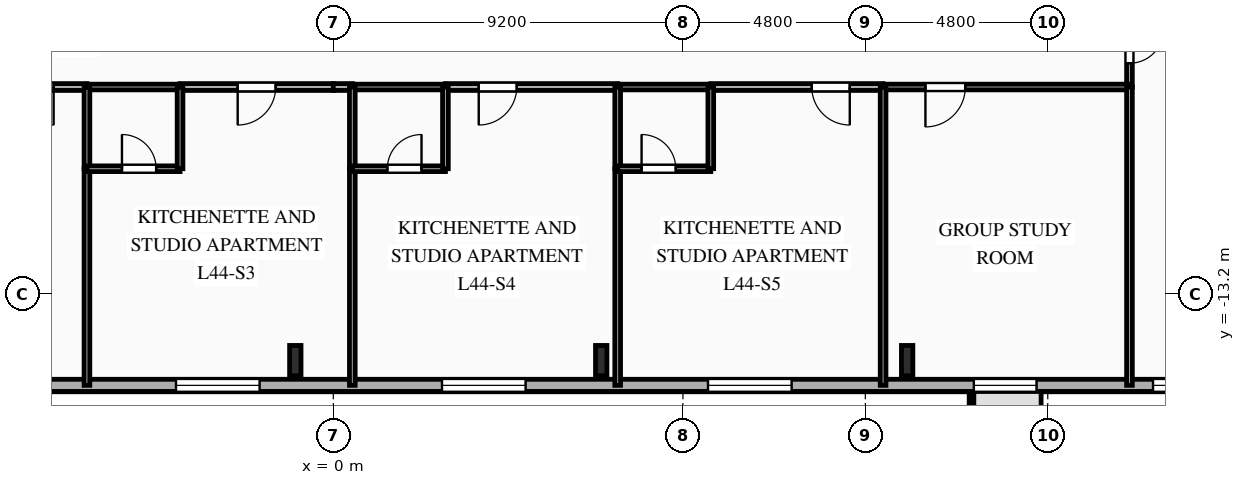
"""IFC4 building model, lengths in metres.
Left out: names, types, materials, properties, quantities, classifications, styles, units other than length and angle.
Written with IfcOpenShell. Run it as: python <this file> out.ifc"""

import sys

from ifc_helpers import new_model, si_unit, direction, frame, frame_2d, origin, origin_2d, place, context, subcontext, project, spatial, rectangle, i_section, extrude, element, fill, save


model = new_model("IFC4")
c1 = context("Model", 3, precision=1e-05, world=origin(), true_north=direction((0.0, 1.0)))
c2 = subcontext(c1, "Body", "Model", "MODEL_VIEW")
j1 = project(units=[si_unit("LENGTHUNIT", "METRE"), si_unit("PLANEANGLEUNIT", "RADIAN")], contexts=[c1])
p1 = place(None, origin())
s1 = spatial("IfcSite", under=j1, at=p1, CompositionType="ELEMENT")
p2 = place(p1, origin())
s2 = spatial("IfcBuilding", under=s1, at=p2, CompositionType="ELEMENT")
p3 = place(p2, frame((0.0, 0.0, 157.8)))
s3 = spatial("IfcBuildingStorey", under=s2, at=p3, CompositionType="ELEMENT", Elevation=157.8)
for number, where, z_axis, x_axis in (
    (1, (-1.0, -14.95, 0.0), (0.0, 0.0, 1.0), (1.0, 0.0, 0.0)),
    (2, (7.05, -14.95, 0.0), (0.0, 0.0, 1.0), (1.0, 0.0, 0.0)),
    (3, (15.1, -14.95, 0.0), (0.0, 0.0, 1.0), (1.0, 0.0, 0.0)),
):
    element("IfcColumn", number, at=place(p3, frame(where, z_axis=z_axis, x_axis=x_axis)), inside=s3, PredefinedType="COLUMN", context=c2, shape_type="SweptSolid", body=[
        extrude(i_section(OverallWidth=0.3, OverallDepth=0.8, WebThickness=0.018, FlangeThickness=0.033, FilletRadius=0.03, at=origin_2d()), origin(), (0.0, 0.0, 1.0), 3.35),
    ])
p4 = place(p3, frame((23.8, -15.6, 0.0), z_axis=(0.0, 0.0, 1.0), x_axis=(-1.0, 0.0, 0.0)))
e4 = element("IfcWall", 4, at=p4, inside=s3, PredefinedType="SOLIDWALL", context=c2, shape_type="SweptSolid", body=[
    extrude(rectangle(XDim=49.6, YDim=0.32, at=frame_2d((24.8, 0.0))), origin(), (0.0, 0.0, 1.0), 3.04),
])
p5 = place(p4, frame((1.13, 0.0, 0.85)))
e5 = element("IfcOpeningElement", 5, at=p5, cuts=e4, PredefinedType="OPENING", context=c2, shape_type="SweptSolid", body=[
    extrude(rectangle(XDim=1.1, YDim=1.85, at=frame_2d((0.55, 0.925))), frame((0.0, 0.17, 0.0), z_axis=(0.0, -1.0, 0.0), x_axis=(1.0, 0.0, 0.0)), (0.0, 0.0, 1.0), 0.34),
])
p6 = place(p4, frame((5.295, 0.0, 0.85)))
e6 = element("IfcOpeningElement", 6, at=p6, cuts=e4, PredefinedType="OPENING", context=c2, shape_type="SweptSolid", body=[
    extrude(rectangle(XDim=1.65, YDim=1.85, at=frame_2d((0.825, 0.925))), frame((0.0, 0.17, 0.0), z_axis=(0.0, -1.0, 0.0), x_axis=(1.0, 0.0, 0.0)), (0.0, 0.0, 1.0), 0.34),
])
p7 = place(p4, frame((11.74, 0.0, 0.85)))
e7 = element("IfcOpeningElement", 7, at=p7, cuts=e4, PredefinedType="OPENING", context=c2, shape_type="SweptSolid", body=[
    extrude(rectangle(XDim=2.2, YDim=1.85, at=frame_2d((1.1, 0.925))), frame((0.0, 0.17, 0.0), z_axis=(0.0, -1.0, 0.0), x_axis=(1.0, 0.0, 0.0)), (0.0, 0.0, 1.0), 0.34),
])
p8 = place(p4, frame((18.74, 0.0, 0.85)))
e8 = element("IfcOpeningElement", 8, at=p8, cuts=e4, PredefinedType="OPENING", context=c2, shape_type="SweptSolid", body=[
    extrude(rectangle(XDim=2.2, YDim=1.85, at=frame_2d((1.1, 0.925))), frame((0.0, 0.17, 0.0), z_axis=(0.0, -1.0, 0.0), x_axis=(1.0, 0.0, 0.0)), (0.0, 0.0, 1.0), 0.34),
])
p9 = place(p4, frame((25.74, 0.0, 0.85)))
e9 = element("IfcOpeningElement", 9, at=p9, cuts=e4, PredefinedType="OPENING", context=c2, shape_type="SweptSolid", body=[
    extrude(rectangle(XDim=2.2, YDim=1.85, at=frame_2d((1.1, 0.925))), frame((0.0, 0.17, 0.0), z_axis=(0.0, -1.0, 0.0), x_axis=(1.0, 0.0, 0.0)), (0.0, 0.0, 1.0), 0.34),
])
p10 = place(p4, frame((33.348, 0.0, 0.85)))
e10 = element("IfcOpeningElement", 10, at=p10, cuts=e4, PredefinedType="OPENING", context=c2, shape_type="SweptSolid", body=[
    extrude(rectangle(XDim=2.2, YDim=1.85, at=frame_2d((1.1, 0.925))), frame((0.0, 0.17, 0.0), z_axis=(0.0, -1.0, 0.0), x_axis=(1.0, 0.0, 0.0)), (0.0, 0.0, 1.0), 0.34),
])
p11 = place(p4, frame((38.972, 0.0, 0.85)))
e11 = element("IfcOpeningElement", 11, at=p11, cuts=e4, PredefinedType="OPENING", context=c2, shape_type="SweptSolid", body=[
    extrude(rectangle(XDim=1.65, YDim=1.85, at=frame_2d((0.825, 0.925))), frame((0.0, 0.17, 0.0), z_axis=(0.0, -1.0, 0.0), x_axis=(1.0, 0.0, 0.0)), (0.0, 0.0, 1.0), 0.34),
])
p12 = place(p4, frame((45.895, 0.0, 0.85)))
e12 = element("IfcOpeningElement", 12, at=p12, cuts=e4, PredefinedType="OPENING", context=c2, shape_type="SweptSolid", body=[
    extrude(rectangle(XDim=1.65, YDim=1.85, at=frame_2d((0.825, 0.925))), frame((0.0, 0.17, 0.0), z_axis=(0.0, -1.0, 0.0), x_axis=(1.0, 0.0, 0.0)), (0.0, 0.0, 1.0), 0.34),
])
p13 = place(p3, frame((-6.483, -7.75, 0.0), z_axis=(0.0, 0.0, 1.0), x_axis=(-1.0, 0.0, 0.0)))
e13 = element("IfcWall", 13, at=p13, inside=s3, PredefinedType="PARTITIONING", context=c2, shape_type="SweptSolid", body=[
    extrude(rectangle(XDim=4.534, YDim=0.18, at=frame_2d((2.267, 0.0))), origin(), (0.0, 0.0, 1.0), 3.04),
])
p14 = place(p13, frame((0.877, 0.0, 0.0)))
e14 = element("IfcOpeningElement", 14, at=p14, cuts=e13, PredefinedType="OPENING", context=c2, shape_type="SweptSolid", body=[
    extrude(rectangle(XDim=1.0, YDim=2.15, at=frame_2d((0.5, 1.075))), frame((0.0, 0.1, 0.0), z_axis=(0.0, -1.0, 0.0), x_axis=(1.0, 0.0, 0.0)), (0.0, 0.0, 1.0), 0.2),
])
p15 = place(p3, frame((0.0, -7.75, 0.0), z_axis=(0.0, 0.0, 1.0), x_axis=(-1.0, 0.0, 0.0)))
e15 = element("IfcWall", 15, at=p15, inside=s3, PredefinedType="PARTITIONING", context=c2, shape_type="SweptSolid", body=[
    extrude(rectangle(XDim=4.033, YDim=0.18, at=frame_2d((2.017, 0.0))), origin(), (0.0, 0.0, 1.0), 3.04),
])
p16 = place(p15, frame((1.517, 0.0, 0.0)))
e16 = element("IfcOpeningElement", 16, at=p16, cuts=e15, PredefinedType="OPENING", context=c2, shape_type="SweptSolid", body=[
    extrude(rectangle(XDim=1.0, YDim=2.15, at=frame_2d((0.5, 1.075))), frame((0.0, 0.1, 0.0), z_axis=(0.0, -1.0, 0.0), x_axis=(1.0, 0.0, 0.0)), (0.0, 0.0, 1.0), 0.2),
])
p17 = place(p3, frame((-4.033, -7.75, 0.0), z_axis=(0.0, 0.0, 1.0), x_axis=(-1.0, 0.0, 0.0)))
e17 = element("IfcWall", 17, at=p17, inside=s3, PredefinedType="PLUMBINGWALL", context=c2, shape_type="SweptSolid", body=[
    extrude(rectangle(XDim=2.45, YDim=0.15, at=frame_2d((1.225, 0.0))), origin(), (0.0, 0.0, 1.0), 3.04),
])
p18 = place(p3, frame((20.95, -5.6, 0.0), z_axis=(0.0, 0.0, 1.0), x_axis=(0.0, -1.0, 0.0)))
e18 = element("IfcWall", 18, at=p18, inside=s3, PredefinedType="PARTITIONING", context=c2, shape_type="SweptSolid", body=[
    extrude(rectangle(XDim=2.15, YDim=0.15, at=frame_2d((1.075, 0.0))), origin(), (0.0, 0.0, 1.0), 3.04),
])
p19 = place(p18, frame((0.625, 0.0, 0.0)))
e19 = element("IfcOpeningElement", 19, at=p19, cuts=e18, PredefinedType="OPENING", context=c2, shape_type="SweptSolid", body=[
    extrude(rectangle(XDim=0.9, YDim=2.1, at=frame_2d((0.45, 1.05))), frame((0.0, 0.085, 0.0), z_axis=(0.0, -1.0, 0.0), x_axis=(1.0, 0.0, 0.0)), (0.0, 0.0, 1.0), 0.17),
])
p20 = place(p3, frame((0.5, -7.75, 0.0), z_axis=(0.0, 0.0, 1.0), x_axis=(-1.0, 0.0, 0.0)))
e20 = element("IfcWall", 20, at=p20, inside=s3, PredefinedType="PARTITIONING", context=c2, shape_type="SweptSolid", body=[
    extrude(rectangle(XDim=0.5, YDim=0.18, at=frame_2d((0.25, 0.0))), origin(), (0.0, 0.0, 1.0), 3.04),
])
p21 = place(p3, frame((7.483, -7.75, 0.0), z_axis=(0.0, 0.0, 1.0), x_axis=(-1.0, 0.0, 0.0)))
e21 = element("IfcWall", 21, at=p21, inside=s3, PredefinedType="PARTITIONING", context=c2, shape_type="SweptSolid", body=[
    extrude(rectangle(XDim=4.533, YDim=0.18, at=frame_2d((2.267, 0.0))), origin(), (0.0, 0.0, 1.0), 3.04),
])
p22 = place(p21, frame((2.656, 0.0, 0.0)))
e22 = element("IfcOpeningElement", 22, at=p22, cuts=e21, PredefinedType="OPENING", context=c2, shape_type="SweptSolid", body=[
    extrude(rectangle(XDim=1.0, YDim=2.15, at=frame_2d((0.5, 1.075))), frame((0.0, 0.1, 0.0), z_axis=(0.0, -1.0, 0.0), x_axis=(1.0, 0.0, 0.0)), (0.0, 0.0, 1.0), 0.2),
])
p23 = place(p3, frame((2.95, -7.75, 0.0), z_axis=(0.0, 0.0, 1.0), x_axis=(-1.0, 0.0, 0.0)))
e23 = element("IfcWall", 23, at=p23, inside=s3, PredefinedType="PLUMBINGWALL", context=c2, shape_type="SweptSolid", body=[
    extrude(rectangle(XDim=2.45, YDim=0.15, at=frame_2d((1.225, 0.0))), origin(), (0.0, 0.0, 1.0), 3.04),
])
p24 = place(p3, frame((14.467, -7.75, 0.0), z_axis=(0.0, 0.0, 1.0), x_axis=(-1.0, 0.0, 0.0)))
e24 = element("IfcWall", 24, at=p24, inside=s3, PredefinedType="PARTITIONING", context=c2, shape_type="SweptSolid", body=[
    extrude(rectangle(XDim=4.534, YDim=0.18, at=frame_2d((2.267, 0.0))), origin(), (0.0, 0.0, 1.0), 3.04),
])
p25 = place(p24, frame((0.877, 0.0, 0.0)))
e25 = element("IfcOpeningElement", 25, at=p25, cuts=e24, PredefinedType="OPENING", context=c2, shape_type="SweptSolid", body=[
    extrude(rectangle(XDim=1.0, YDim=2.15, at=frame_2d((0.5, 1.075))), frame((0.0, 0.1, 0.0), z_axis=(0.0, -1.0, 0.0), x_axis=(1.0, 0.0, 0.0)), (0.0, 0.0, 1.0), 0.2),
])
p26 = place(p3, frame((9.933, -7.75, 0.0), z_axis=(0.0, 0.0, 1.0), x_axis=(-1.0, 0.0, 0.0)))
e26 = element("IfcWall", 26, at=p26, inside=s3, PredefinedType="PLUMBINGWALL", context=c2, shape_type="SweptSolid", body=[
    extrude(rectangle(XDim=2.45, YDim=0.15, at=frame_2d((1.225, 0.0))), origin(), (0.0, 0.0, 1.0), 3.04),
])
p27 = place(p3, frame((20.95, -7.75, 0.0), z_axis=(0.0, 0.0, 1.0), x_axis=(-1.0, 0.0, 0.0)))
e27 = element("IfcWall", 27, at=p27, inside=s3, PredefinedType="PARTITIONING", context=c2, shape_type="SweptSolid", body=[
    extrude(rectangle(XDim=6.483, YDim=0.15, at=frame_2d((3.241, 0.0))), origin(), (0.0, 0.0, 1.0), 3.04),
])
p28 = place(p27, frame((4.319, 0.0, 0.0)))
e28 = element("IfcOpeningElement", 28, at=p28, cuts=e27, PredefinedType="OPENING", context=c2, shape_type="SweptSolid", body=[
    extrude(rectangle(XDim=1.05, YDim=2.15, at=frame_2d((0.525, 1.075))), frame((0.0, 0.085, 0.0), z_axis=(0.0, -1.0, 0.0), x_axis=(1.0, 0.0, 0.0)), (0.0, 0.0, 1.0), 0.17),
])
p29 = place(p3, frame((20.95, -15.6, 0.0), z_axis=(0.0, 0.0, 1.0), x_axis=(0.0, 1.0, 0.0)))
e29 = element("IfcWall", 29, at=p29, inside=s3, PredefinedType="PARTITIONING", context=c2, shape_type="SweptSolid", body=[
    extrude(rectangle(XDim=7.85, YDim=0.15, at=frame_2d((3.925, 0.0))), origin(), (0.0, 0.0, 1.0), 3.04),
])
p30 = place(p3, frame((-6.483, -9.9, 0.0), z_axis=(0.0, 0.0, 1.0), x_axis=(0.0, -1.0, 0.0)))
e30 = element("IfcWall", 30, at=p30, inside=s3, PredefinedType="PARTITIONING", context=c2, shape_type="SweptSolid", body=[
    extrude(rectangle(XDim=5.7, YDim=0.15, at=frame_2d((2.85, 0.0))), origin(), (0.0, 0.0, 1.0), 3.04),
])
p31 = place(p3, frame((-6.483, -7.75, 0.0), z_axis=(0.0, 0.0, 1.0), x_axis=(0.0, -1.0, 0.0)))
e31 = element("IfcWall", 31, at=p31, inside=s3, PredefinedType="PLUMBINGWALL", context=c2, shape_type="SweptSolid", body=[
    extrude(rectangle(XDim=2.15, YDim=0.15, at=frame_2d((1.075, 0.0))), origin(), (0.0, 0.0, 1.0), 3.04),
])
p32 = place(p3, frame((-6.483, -9.9, 0.0), z_axis=(0.0, 0.0, 1.0), x_axis=(1.0, 0.0, 0.0)))
e32 = element("IfcWall", 32, at=p32, inside=s3, PredefinedType="PLUMBINGWALL", context=c2, shape_type="SweptSolid", body=[
    extrude(rectangle(XDim=2.45, YDim=0.15, at=frame_2d((1.225, 0.0))), origin(), (0.0, 0.0, 1.0), 3.04),
])
p33 = place(p32, frame((0.921, 0.0, 0.0)))
e33 = element("IfcOpeningElement", 33, at=p33, cuts=e32, PredefinedType="OPENING", context=c2, shape_type="SweptSolid", body=[
    extrude(rectangle(XDim=0.9, YDim=2.1, at=frame_2d((0.45, 1.05))), frame((0.0, 0.085, 0.0), z_axis=(0.0, -1.0, 0.0), x_axis=(1.0, 0.0, 0.0)), (0.0, 0.0, 1.0), 0.17),
])
p34 = place(p3, frame((-4.033, -9.9, 0.0), z_axis=(0.0, 0.0, 1.0), x_axis=(0.0, 1.0, 0.0)))
e34 = element("IfcWall", 34, at=p34, inside=s3, PredefinedType="PLUMBINGWALL", context=c2, shape_type="SweptSolid", body=[
    extrude(rectangle(XDim=2.15, YDim=0.15, at=frame_2d((1.075, 0.0))), origin(), (0.0, 0.0, 1.0), 3.04),
])
p35 = place(p3, frame((0.5, -9.9, 0.0), z_axis=(0.0, 0.0, 1.0), x_axis=(0.0, -1.0, 0.0)))
e35 = element("IfcWall", 35, at=p35, inside=s3, PredefinedType="PARTITIONING", context=c2, shape_type="SweptSolid", body=[
    extrude(rectangle(XDim=5.7, YDim=0.15, at=frame_2d((2.85, 0.0))), origin(), (0.0, 0.0, 1.0), 3.04),
])
p36 = place(p3, frame((0.5, -7.75, 0.0), z_axis=(0.0, 0.0, 1.0), x_axis=(0.0, -1.0, 0.0)))
e36 = element("IfcWall", 36, at=p36, inside=s3, PredefinedType="PLUMBINGWALL", context=c2, shape_type="SweptSolid", body=[
    extrude(rectangle(XDim=2.15, YDim=0.15, at=frame_2d((1.075, 0.0))), origin(), (0.0, 0.0, 1.0), 3.04),
])
p37 = place(p3, frame((0.5, -9.9, 0.0), z_axis=(0.0, 0.0, 1.0), x_axis=(1.0, 0.0, 0.0)))
e37 = element("IfcWall", 37, at=p37, inside=s3, PredefinedType="PLUMBINGWALL", context=c2, shape_type="SweptSolid", body=[
    extrude(rectangle(XDim=2.45, YDim=0.15, at=frame_2d((1.225, 0.0))), origin(), (0.0, 0.0, 1.0), 3.04),
])
p38 = place(p37, frame((0.921, 0.0, 0.0)))
e38 = element("IfcOpeningElement", 38, at=p38, cuts=e37, PredefinedType="OPENING", context=c2, shape_type="SweptSolid", body=[
    extrude(rectangle(XDim=0.9, YDim=2.1, at=frame_2d((0.45, 1.05))), frame((0.0, 0.085, 0.0), z_axis=(0.0, -1.0, 0.0), x_axis=(1.0, 0.0, 0.0)), (0.0, 0.0, 1.0), 0.17),
])
p39 = place(p3, frame((2.95, -9.9, 0.0), z_axis=(0.0, 0.0, 1.0), x_axis=(0.0, 1.0, 0.0)))
e39 = element("IfcWall", 39, at=p39, inside=s3, PredefinedType="PLUMBINGWALL", context=c2, shape_type="SweptSolid", body=[
    extrude(rectangle(XDim=2.15, YDim=0.15, at=frame_2d((1.075, 0.0))), origin(), (0.0, 0.0, 1.0), 3.04),
])
p40 = place(p3, frame((7.483, -9.9, 0.0), z_axis=(0.0, 0.0, 1.0), x_axis=(0.0, -1.0, 0.0)))
e40 = element("IfcWall", 40, at=p40, inside=s3, PredefinedType="PARTITIONING", context=c2, shape_type="SweptSolid", body=[
    extrude(rectangle(XDim=5.7, YDim=0.15, at=frame_2d((2.85, 0.0))), origin(), (0.0, 0.0, 1.0), 2.525),
])
p41 = place(p3, frame((7.483, -7.75, 0.0), z_axis=(0.0, 0.0, 1.0), x_axis=(0.0, -1.0, 0.0)))
e41 = element("IfcWall", 41, at=p41, inside=s3, PredefinedType="PLUMBINGWALL", context=c2, shape_type="SweptSolid", body=[
    extrude(rectangle(XDim=2.15, YDim=0.15, at=frame_2d((1.075, 0.0))), origin(), (0.0, 0.0, 1.0), 3.04),
])
p42 = place(p3, frame((7.483, -9.9, 0.0), z_axis=(0.0, 0.0, 1.0), x_axis=(1.0, 0.0, 0.0)))
e42 = element("IfcWall", 42, at=p42, inside=s3, PredefinedType="PLUMBINGWALL", context=c2, shape_type="SweptSolid", body=[
    extrude(rectangle(XDim=2.45, YDim=0.15, at=frame_2d((1.225, 0.0))), origin(), (0.0, 0.0, 1.0), 3.04),
])
p43 = place(p42, frame((0.629, 0.0, 0.0)))
e43 = element("IfcOpeningElement", 43, at=p43, cuts=e42, PredefinedType="OPENING", context=c2, shape_type="SweptSolid", body=[
    extrude(rectangle(XDim=0.9, YDim=2.1, at=frame_2d((0.45, 1.05))), frame((0.0, 0.085, 0.0), z_axis=(0.0, -1.0, 0.0), x_axis=(1.0, 0.0, 0.0)), (0.0, 0.0, 1.0), 0.17),
])
p44 = place(p3, frame((9.933, -9.9, 0.0), z_axis=(0.0, 0.0, 1.0), x_axis=(0.0, 1.0, 0.0)))
e44 = element("IfcWall", 44, at=p44, inside=s3, PredefinedType="PLUMBINGWALL", context=c2, shape_type="SweptSolid", body=[
    extrude(rectangle(XDim=2.15, YDim=0.15, at=frame_2d((1.075, 0.0))), origin(), (0.0, 0.0, 1.0), 3.04),
])
p45 = place(p3, frame((14.467, -7.75, 0.0), z_axis=(0.0, 0.0, 1.0), x_axis=(0.0, -1.0, 0.0)))
e45 = element("IfcWall", 45, at=p45, inside=s3, PredefinedType="PARTITIONING", context=c2, shape_type="SweptSolid", body=[
    extrude(rectangle(XDim=7.85, YDim=0.15, at=frame_2d((3.925, 0.0))), origin(), (0.0, 0.0, 1.0), 3.04),
])
p46 = place(p5, origin())
e46 = element("IfcWindow", 46, at=p46, inside=s3, PartitioningType="SINGLE_PANEL", PredefinedType="WINDOW", context=c2, shape_type="SweptSolid", body=[
    extrude(rectangle(XDim=1.1, YDim=1.85, at=frame_2d((0.55, 0.925))), frame((0.0, 0.03, 0.0), z_axis=(0.0, -1.0, 0.0), x_axis=(1.0, 0.0, 0.0)), (0.0, 0.0, 1.0), 0.06),
])
fill(e5, e46)
p47 = place(p6, origin())
e47 = element("IfcWindow", 47, at=p47, inside=s3, PartitioningType="SINGLE_PANEL", PredefinedType="WINDOW", context=c2, shape_type="SweptSolid", body=[
    extrude(rectangle(XDim=1.65, YDim=1.85, at=frame_2d((0.825, 0.925))), frame((0.0, 0.03, 0.0), z_axis=(0.0, -1.0, 0.0), x_axis=(1.0, 0.0, 0.0)), (0.0, 0.0, 1.0), 0.06),
])
fill(e6, e47)
p48 = place(p7, origin())
e48 = element("IfcWindow", 48, at=p48, inside=s3, PartitioningType="SINGLE_PANEL", PredefinedType="WINDOW", context=c2, shape_type="SweptSolid", body=[
    extrude(rectangle(XDim=2.2, YDim=1.85, at=frame_2d((1.1, 0.925))), frame((0.0, 0.03, 0.0), z_axis=(0.0, -1.0, 0.0), x_axis=(1.0, 0.0, 0.0)), (0.0, 0.0, 1.0), 0.06),
])
fill(e7, e48)
p49 = place(p8, origin())
e49 = element("IfcWindow", 49, at=p49, inside=s3, PartitioningType="SINGLE_PANEL", PredefinedType="WINDOW", context=c2, shape_type="SweptSolid", body=[
    extrude(rectangle(XDim=2.2, YDim=1.85, at=frame_2d((1.1, 0.925))), frame((0.0, 0.03, 0.0), z_axis=(0.0, -1.0, 0.0), x_axis=(1.0, 0.0, 0.0)), (0.0, 0.0, 1.0), 0.06),
])
fill(e8, e49)
p50 = place(p9, origin())
e50 = element("IfcWindow", 50, at=p50, inside=s3, PartitioningType="SINGLE_PANEL", PredefinedType="WINDOW", context=c2, shape_type="SweptSolid", body=[
    extrude(rectangle(XDim=2.2, YDim=1.85, at=frame_2d((1.1, 0.925))), frame((0.0, 0.03, 0.0), z_axis=(0.0, -1.0, 0.0), x_axis=(1.0, 0.0, 0.0)), (0.0, 0.0, 1.0), 0.06),
])
fill(e9, e50)
p51 = place(p14, origin())
e51 = element("IfcDoor", 51, at=p51, inside=s3, OperationType="SINGLE_SWING_LEFT", PredefinedType="DOOR", context=c2, shape_type="SweptSolid", body=[
    extrude(rectangle(XDim=1.0, YDim=2.15, at=frame_2d((0.5, 1.075))), frame((0.0, 0.025, 0.0), z_axis=(0.0, -1.0, 0.0), x_axis=(1.0, 0.0, 0.0)), (0.0, 0.0, 1.0), 0.05),
])
fill(e14, e51)
p52 = place(p16, origin())
e52 = element("IfcDoor", 52, at=p52, inside=s3, OperationType="SINGLE_SWING_RIGHT", PredefinedType="DOOR", context=c2, shape_type="SweptSolid", body=[
    extrude(rectangle(XDim=1.0, YDim=2.15, at=frame_2d((0.5, 1.075))), frame((0.0, 0.025, 0.0), z_axis=(0.0, -1.0, 0.0), x_axis=(1.0, 0.0, 0.0)), (0.0, 0.0, 1.0), 0.05),
])
fill(e16, e52)
p53 = place(p19, origin())
e53 = element("IfcDoor", 53, at=p53, inside=s3, OperationType="SINGLE_SWING_LEFT", PredefinedType="DOOR", context=c2, shape_type="SweptSolid", body=[
    extrude(rectangle(XDim=0.9, YDim=2.1, at=frame_2d((0.45, 1.05))), frame((0.0, 0.025, 0.0), z_axis=(0.0, -1.0, 0.0), x_axis=(1.0, 0.0, 0.0)), (0.0, 0.0, 1.0), 0.05),
])
fill(e19, e53)
p54 = place(p22, origin())
e54 = element("IfcDoor", 54, at=p54, inside=s3, OperationType="SINGLE_SWING_RIGHT", PredefinedType="DOOR", context=c2, shape_type="SweptSolid", body=[
    extrude(rectangle(XDim=1.0, YDim=2.15, at=frame_2d((0.5, 1.075))), frame((0.0, 0.025, 0.0), z_axis=(0.0, -1.0, 0.0), x_axis=(1.0, 0.0, 0.0)), (0.0, 0.0, 1.0), 0.05),
])
fill(e22, e54)
p55 = place(p25, origin())
e55 = element("IfcDoor", 55, at=p55, inside=s3, OperationType="SINGLE_SWING_LEFT", PredefinedType="DOOR", context=c2, shape_type="SweptSolid", body=[
    extrude(rectangle(XDim=1.0, YDim=2.15, at=frame_2d((0.5, 1.075))), frame((0.0, 0.025, 0.0), z_axis=(0.0, -1.0, 0.0), x_axis=(1.0, 0.0, 0.0)), (0.0, 0.0, 1.0), 0.05),
])
fill(e25, e55)
p56 = place(p28, origin())
e56 = element("IfcDoor", 56, at=p56, inside=s3, OperationType="SINGLE_SWING_RIGHT", PredefinedType="DOOR", context=c2, shape_type="SweptSolid", body=[
    extrude(rectangle(XDim=1.05, YDim=2.15, at=frame_2d((0.525, 1.075))), frame((0.0, 0.025, 0.0), z_axis=(0.0, -1.0, 0.0), x_axis=(1.0, 0.0, 0.0)), (0.0, 0.0, 1.0), 0.05),
])
fill(e28, e56)
p57 = place(p33, origin())
e57 = element("IfcDoor", 57, at=p57, inside=s3, OperationType="SINGLE_SWING_LEFT", PredefinedType="DOOR", context=c2, shape_type="SweptSolid", body=[
    extrude(rectangle(XDim=0.9, YDim=2.1, at=frame_2d((0.45, 1.05))), frame((0.0, 0.025, 0.0), z_axis=(0.0, -1.0, 0.0), x_axis=(1.0, 0.0, 0.0)), (0.0, 0.0, 1.0), 0.05),
])
fill(e33, e57)
p58 = place(p38, origin())
e58 = element("IfcDoor", 58, at=p58, inside=s3, OperationType="SINGLE_SWING_RIGHT", PredefinedType="DOOR", context=c2, shape_type="SweptSolid", body=[
    extrude(rectangle(XDim=0.9, YDim=2.1, at=frame_2d((0.45, 1.05))), frame((0.0, 0.025, 0.0), z_axis=(0.0, -1.0, 0.0), x_axis=(1.0, 0.0, 0.0)), (0.0, 0.0, 1.0), 0.05),
])
fill(e38, e58)
p59 = place(p43, origin())
e59 = element("IfcDoor", 59, at=p59, inside=s3, OperationType="SINGLE_SWING_LEFT", PredefinedType="DOOR", context=c2, shape_type="SweptSolid", body=[
    extrude(rectangle(XDim=0.9, YDim=2.1, at=frame_2d((0.45, 1.05))), frame((0.0, 0.025, 0.0), z_axis=(0.0, -1.0, 0.0), x_axis=(1.0, 0.0, 0.0)), (0.0, 0.0, 1.0), 0.05),
])
fill(e43, e59)
save(model, sys.argv[1])
